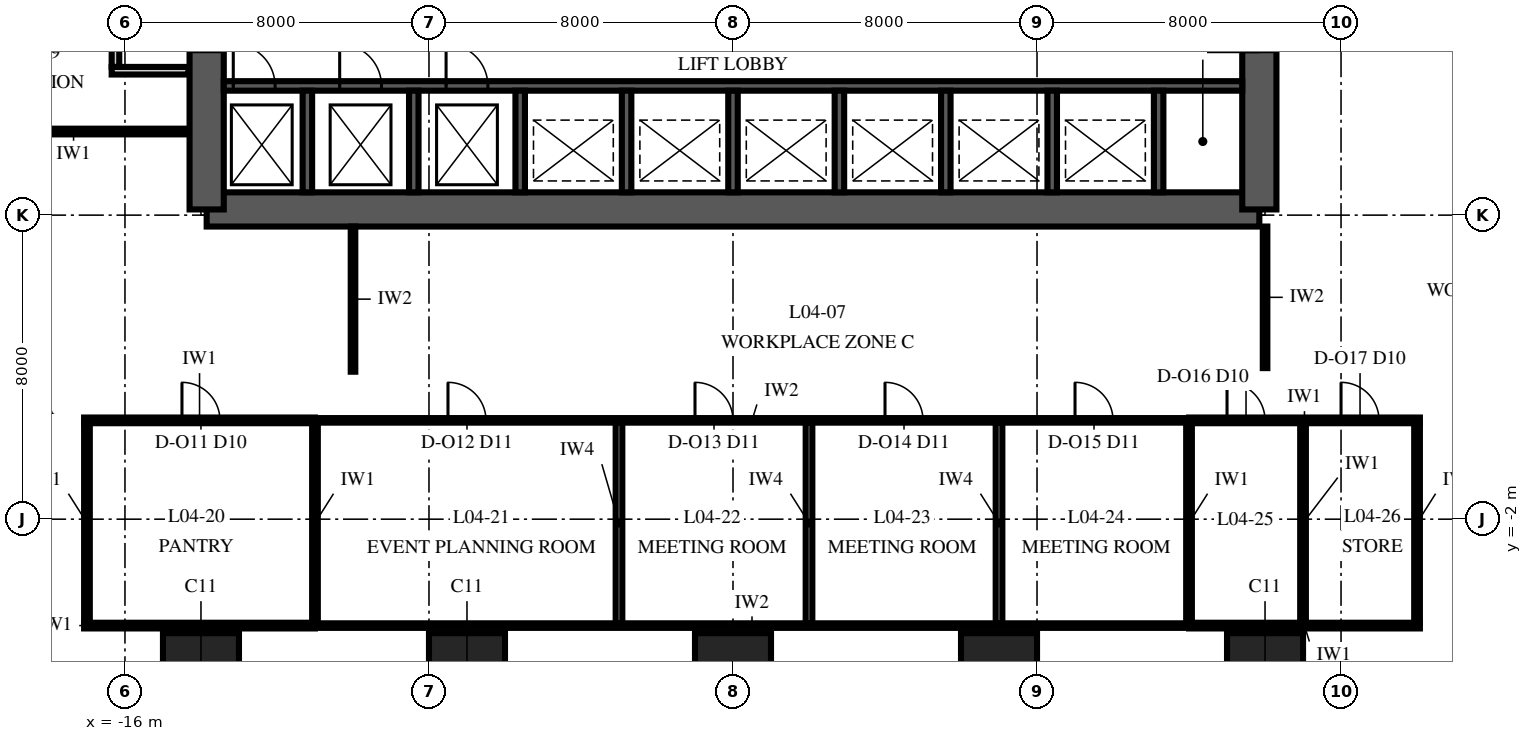
"""IFC4 building model, lengths in metres.
Left out: names, types, materials, properties, quantities, classifications, styles, units other than length and angle.
Written with IfcOpenShell. Run it as: python <this file> out.ifc"""

import sys

from ifc_helpers import new_model, si_unit, direction, frame, frame_2d, origin, origin_2d, place, context, subcontext, project, spatial, polyline, rectangle, outline, extrude, element, fill, save


model = new_model("IFC4")
c1 = context("Model", 3, precision=1e-05, world=origin(), true_north=direction((0.0, 1.0)))
c2 = subcontext(c1, "Body", "Model", "MODEL_VIEW")
j1 = project(units=[si_unit("LENGTHUNIT", "METRE"), si_unit("PLANEANGLEUNIT", "RADIAN")], contexts=[c1])
p1 = place(None, origin())
s1 = spatial("IfcSite", under=j1, at=p1, CompositionType="ELEMENT")
p2 = place(p1, origin())
s2 = spatial("IfcBuilding", under=s1, at=p2, CompositionType="ELEMENT")
p3 = place(p2, frame((0.0, 0.0, 28.0)))
s3 = spatial("IfcBuildingStorey", under=s2, at=p3, CompositionType="ELEMENT", Elevation=28.0)
for number, where, z_axis, x_axis in (
    (1, (-14.0, -6.0, 0.0), (0.0, 0.0, 1.0), (1.0, 0.0, 0.0)),
    (2, (-7.0, -6.0, 0.0), (0.0, 0.0, 1.0), (1.0, 0.0, 0.0)),
    (3, (0.0, -6.0, 0.0), (0.0, 0.0, 1.0), (1.0, 0.0, 0.0)),
    (4, (7.0, -6.0, 0.0), (0.0, 0.0, 1.0), (1.0, 0.0, 0.0)),
    (5, (14.0, -6.0, 0.0), (0.0, 0.0, 1.0), (1.0, 0.0, 0.0)),
):
    element("IfcColumn", number, at=place(p3, frame(where, z_axis=z_axis, x_axis=x_axis)), inside=s3, PredefinedType="COLUMN", context=c2, shape_type="SweptSolid", body=[
        extrude(rectangle(XDim=2.0, YDim=2.0, at=origin_2d()), origin(), (0.0, 0.0, 1.0), 4.0),
    ])
p4 = place(p3, frame((-13.85, 6.15, 0.0), z_axis=(0.0, 0.0, 1.0), x_axis=(1.0, 0.0, 0.0)))
e6 = element("IfcWall", 6, at=p4, inside=s3, PredefinedType="SHEAR", context=c2, shape_type="SweptSolid", body=[
    extrude(rectangle(XDim=27.7, YDim=0.9, at=frame_2d((13.85, 0.0))), origin(), (0.0, 0.0, 1.0), 4.0),
])
p5 = place(p3, frame((13.85, 6.15, 0.0), z_axis=(0.0, 0.0, 1.0), x_axis=(0.0, 1.0, 0.0)))
e7 = element("IfcWall", 7, at=p5, inside=s3, PredefinedType="SHEAR", context=c2, shape_type="SweptSolid", body=[
    extrude(outline(polyline([(0.0, -0.45), (17.7, -0.45), (17.7, 0.0), (17.25, 0.0), (17.25, 0.45), (0.45, 0.45), (0.45, 0.0), (0.0, 0.0), (0.0, -0.45)])), origin(), (0.0, 0.0, 1.0), 4.0),
])
p6 = place(p5, frame((4.15, 0.0, 0.0)))
e8 = element("IfcOpeningElement", 8, at=p6, cuts=e7, PredefinedType="OPENING", context=c2, shape_type="SweptSolid", body=[
    extrude(rectangle(XDim=1.8, YDim=2.4, at=frame_2d((0.9, 1.2))), frame((0.0, 0.465, 0.0), z_axis=(0.0, -1.0, 0.0), x_axis=(1.0, 0.0, 0.0)), (0.0, 0.0, 1.0), 0.93),
])
p7 = place(p3, frame((-13.85, 23.85, 0.0), z_axis=(0.0, 0.0, 1.0), x_axis=(0.0, -1.0, 0.0)))
e9 = element("IfcWall", 9, at=p7, inside=s3, PredefinedType="SHEAR", context=c2, shape_type="SweptSolid", body=[
    extrude(outline(polyline([(0.0, -0.45), (17.7, -0.45), (17.7, 0.0), (17.25, 0.0), (17.25, 0.45), (0.45, 0.45), (0.45, 0.0), (0.0, 0.0), (0.0, -0.45)])), origin(), (0.0, 0.0, 1.0), 4.0),
])
p8 = place(p7, frame((11.75, 0.0, 0.0)))
e10 = element("IfcOpeningElement", 10, at=p8, cuts=e9, PredefinedType="OPENING", context=c2, shape_type="SweptSolid", body=[
    extrude(rectangle(XDim=1.8, YDim=2.4, at=frame_2d((0.9, 1.2))), frame((0.0, 0.465, 0.0), z_axis=(0.0, -1.0, 0.0), x_axis=(1.0, 0.0, 0.0)), (0.0, 0.0, 1.0), 0.93),
])
p9 = place(p3, frame((-13.4, 9.4, 0.0), z_axis=(0.0, 0.0, 1.0), x_axis=(1.0, 0.0, 0.0)))
e11 = element("IfcWall", 11, at=p9, inside=s3, PredefinedType="SHEAR", context=c2, shape_type="SweptSolid", body=[
    extrude(rectangle(XDim=26.8, YDim=0.25, at=frame_2d((13.4, 0.0))), origin(), (0.0, 0.0, 1.0), 4.0),
])
p10 = place(p9, frame((0.25, 0.0, 0.0)))
e12 = element("IfcOpeningElement", 12, at=p10, cuts=e11, PredefinedType="OPENING", context=c2, shape_type="SweptSolid", body=[
    extrude(rectangle(XDim=1.1, YDim=2.1, at=frame_2d((0.55, 1.05))), frame((0.0, 0.14, 0.0), z_axis=(0.0, -1.0, 0.0), x_axis=(1.0, 0.0, 0.0)), (0.0, 0.0, 1.0), 0.28),
])
p11 = place(p9, frame((3.05, 0.0, 0.0)))
e13 = element("IfcOpeningElement", 13, at=p11, cuts=e11, PredefinedType="OPENING", context=c2, shape_type="SweptSolid", body=[
    extrude(rectangle(XDim=1.1, YDim=2.1, at=frame_2d((0.55, 1.05))), frame((0.0, 0.14, 0.0), z_axis=(0.0, -1.0, 0.0), x_axis=(1.0, 0.0, 0.0)), (0.0, 0.0, 1.0), 0.28),
])
p12 = place(p9, frame((5.85, 0.0, 0.0)))
e14 = element("IfcOpeningElement", 14, at=p12, cuts=e11, PredefinedType="OPENING", context=c2, shape_type="SweptSolid", body=[
    extrude(rectangle(XDim=1.1, YDim=2.1, at=frame_2d((0.55, 1.05))), frame((0.0, 0.14, 0.0), z_axis=(0.0, -1.0, 0.0), x_axis=(1.0, 0.0, 0.0)), (0.0, 0.0, 1.0), 0.28),
])
for number, where, z_axis, x_axis in (
    (15, (-11.2, 6.6, 0.0), (0.0, 0.0, 1.0), (0.0, 1.0, 0.0)),
    (16, (-8.4, 6.6, 0.0), (0.0, 0.0, 1.0), (0.0, 1.0, 0.0)),
    (17, (-5.6, 6.6, 0.0), (0.0, 0.0, 1.0), (0.0, 1.0, 0.0)),
    (18, (-2.8, 6.6, 0.0), (0.0, 0.0, 1.0), (0.0, 1.0, 0.0)),
    (19, (0.0, 6.6, 0.0), (0.0, 0.0, 1.0), (0.0, 1.0, 0.0)),
    (20, (2.8, 6.6, 0.0), (0.0, 0.0, 1.0), (0.0, 1.0, 0.0)),
    (21, (5.6, 6.6, 0.0), (0.0, 0.0, 1.0), (0.0, 1.0, 0.0)),
    (22, (8.4, 6.6, 0.0), (0.0, 0.0, 1.0), (0.0, 1.0, 0.0)),
    (23, (11.2, 6.6, 0.0), (0.0, 0.0, 1.0), (0.0, 1.0, 0.0)),
):
    element("IfcWall", number, at=place(p3, frame(where, z_axis=z_axis, x_axis=x_axis)), inside=s3, PredefinedType="SHEAR", context=c2, shape_type="SweptSolid", body=[
        extrude(rectangle(XDim=2.675, YDim=0.25, at=frame_2d((1.337, 0.0))), origin(), (0.0, 0.0, 1.0), 4.0),
    ])
p13 = place(p3, frame((-17.075, -4.8, 0.0), z_axis=(0.0, 0.0, 1.0), x_axis=(1.0, 0.0, 0.0)))
e24 = element("IfcWall", 24, at=p13, inside=s3, PredefinedType="PARTITIONING", context=c2, shape_type="SweptSolid", body=[
    extrude(rectangle(XDim=6.075, YDim=0.15, at=frame_2d((3.038, 0.0))), origin(), (0.0, 0.0, 1.0), 3.25),
])
p14 = place(p3, frame((-11.0, -4.8, 0.0), z_axis=(0.0, 0.0, 1.0), x_axis=(1.0, 0.0, 0.0)))
e25 = element("IfcWall", 25, at=p14, inside=s3, PredefinedType="PARTITIONING", context=c2, shape_type="SweptSolid", body=[
    extrude(rectangle(XDim=23.0, YDim=0.12, at=frame_2d((11.5, 0.0))), origin(), (0.0, 0.0, 1.0), 3.25),
])
p15 = place(p3, frame((12.0, -4.8, 0.0), z_axis=(0.0, 0.0, 1.0), x_axis=(1.0, 0.0, 0.0)))
e26 = element("IfcWall", 26, at=p15, inside=s3, PredefinedType="PARTITIONING", context=c2, shape_type="SweptSolid", body=[
    extrude(rectangle(XDim=6.075, YDim=0.15, at=frame_2d((3.038, 0.0))), origin(), (0.0, 0.0, 1.0), 3.25),
])
p16 = place(p3, frame((-17.075, 0.6, 0.0), z_axis=(0.0, 0.0, 1.0), x_axis=(1.0, 0.0, 0.0)))
e27 = element("IfcWall", 27, at=p16, inside=s3, PredefinedType="PARTITIONING", context=c2, shape_type="SweptSolid", body=[
    extrude(rectangle(XDim=6.075, YDim=0.15, at=frame_2d((3.038, 0.0))), origin(), (0.0, 0.0, 1.0), 3.25),
])
p17 = place(p16, frame((2.575, 0.0, 0.0)))
e28 = element("IfcOpeningElement", 28, at=p17, cuts=e27, PredefinedType="OPENING", context=c2, shape_type="SweptSolid", body=[
    extrude(rectangle(XDim=1.0, YDim=2.3, at=frame_2d((0.5, 1.15))), frame((0.0, 0.09, 0.0), z_axis=(0.0, -1.0, 0.0), x_axis=(1.0, 0.0, 0.0)), (0.0, 0.0, 1.0), 0.18),
])
p18 = place(p3, frame((-11.0, 0.6, 0.0), z_axis=(0.0, 0.0, 1.0), x_axis=(1.0, 0.0, 0.0)))
e29 = element("IfcWall", 29, at=p18, inside=s3, PredefinedType="PARTITIONING", context=c2, shape_type="SweptSolid", body=[
    extrude(rectangle(XDim=23.0, YDim=0.12, at=frame_2d((11.5, 0.0))), origin(), (0.0, 0.0, 1.0), 3.25),
])
p19 = place(p18, frame((3.5, 0.0, 0.0)))
e30 = element("IfcOpeningElement", 30, at=p19, cuts=e29, PredefinedType="OPENING", context=c2, shape_type="SweptSolid", body=[
    extrude(rectangle(XDim=1.0, YDim=2.4, at=frame_2d((0.5, 1.2))), frame((0.0, 0.075, 0.0), z_axis=(0.0, -1.0, 0.0), x_axis=(1.0, 0.0, 0.0)), (0.0, 0.0, 1.0), 0.15),
])
p20 = place(p18, frame((10.0, 0.0, 0.0)))
e31 = element("IfcOpeningElement", 31, at=p20, cuts=e29, PredefinedType="OPENING", context=c2, shape_type="SweptSolid", body=[
    extrude(rectangle(XDim=1.0, YDim=2.4, at=frame_2d((0.5, 1.2))), frame((0.0, 0.075, 0.0), z_axis=(0.0, -1.0, 0.0), x_axis=(1.0, 0.0, 0.0)), (0.0, 0.0, 1.0), 0.15),
])
p21 = place(p18, frame((15.0, 0.0, 0.0)))
e32 = element("IfcOpeningElement", 32, at=p21, cuts=e29, PredefinedType="OPENING", context=c2, shape_type="SweptSolid", body=[
    extrude(rectangle(XDim=1.0, YDim=2.4, at=frame_2d((0.5, 1.2))), frame((0.0, 0.075, 0.0), z_axis=(0.0, -1.0, 0.0), x_axis=(1.0, 0.0, 0.0)), (0.0, 0.0, 1.0), 0.15),
])
p22 = place(p18, frame((20.0, 0.0, 0.0)))
e33 = element("IfcOpeningElement", 33, at=p22, cuts=e29, PredefinedType="OPENING", context=c2, shape_type="SweptSolid", body=[
    extrude(rectangle(XDim=1.0, YDim=2.4, at=frame_2d((0.5, 1.2))), frame((0.0, 0.075, 0.0), z_axis=(0.0, -1.0, 0.0), x_axis=(1.0, 0.0, 0.0)), (0.0, 0.0, 1.0), 0.15),
])
p23 = place(p3, frame((12.0, 0.6, 0.0), z_axis=(0.0, 0.0, 1.0), x_axis=(1.0, 0.0, 0.0)))
e34 = element("IfcWall", 34, at=p23, inside=s3, PredefinedType="PARTITIONING", context=c2, shape_type="SweptSolid", body=[
    extrude(rectangle(XDim=6.075, YDim=0.15, at=frame_2d((3.038, 0.0))), origin(), (0.0, 0.0, 1.0), 3.25),
])
p24 = place(p23, frame((1.0, 0.0, 0.0)))
e35 = element("IfcOpeningElement", 35, at=p24, cuts=e34, PredefinedType="OPENING", context=c2, shape_type="SweptSolid", body=[
    extrude(rectangle(XDim=1.0, YDim=2.3, at=frame_2d((0.5, 1.15))), frame((0.0, 0.09, 0.0), z_axis=(0.0, -1.0, 0.0), x_axis=(1.0, 0.0, 0.0)), (0.0, 0.0, 1.0), 0.18),
])
p25 = place(p23, frame((4.0, 0.0, 0.0)))
e36 = element("IfcOpeningElement", 36, at=p25, cuts=e34, PredefinedType="OPENING", context=c2, shape_type="SweptSolid", body=[
    extrude(rectangle(XDim=1.0, YDim=2.3, at=frame_2d((0.5, 1.15))), frame((0.0, 0.09, 0.0), z_axis=(0.0, -1.0, 0.0), x_axis=(1.0, 0.0, 0.0)), (0.0, 0.0, 1.0), 0.18),
])
p26 = place(p3, frame((-20.375, 8.2, 0.0), z_axis=(0.0, 0.0, 1.0), x_axis=(1.0, 0.0, 0.0)))
e37 = element("IfcWall", 37, at=p26, inside=s3, PredefinedType="PARTITIONING", context=c2, shape_type="SweptSolid", body=[
    extrude(rectangle(XDim=6.045, YDim=0.15, at=frame_2d((3.022, 0.0))), origin(), (0.0, 0.0, 1.0), 3.85),
])
p27 = place(p3, frame((-16.35, 9.8, 0.0), z_axis=(0.0, 0.0, 1.0), x_axis=(1.0, 0.0, 0.0)))
e38 = element("IfcWall", 38, at=p27, inside=s3, PredefinedType="PARTITIONING", context=c2, shape_type="SweptSolid", body=[
    extrude(rectangle(XDim=2.02, YDim=0.2, at=frame_2d((1.01, 0.0))), origin(), (0.0, 0.0, 1.0), 3.85),
])
p28 = place(p3, frame((-17.0, -4.725, 0.0), z_axis=(0.0, 0.0, 1.0), x_axis=(0.0, 1.0, 0.0)))
e39 = element("IfcWall", 39, at=p28, inside=s3, PredefinedType="PARTITIONING", context=c2, shape_type="SweptSolid", body=[
    extrude(rectangle(XDim=5.25, YDim=0.15, at=frame_2d((2.625, 0.0))), origin(), (0.0, 0.0, 1.0), 3.85),
])
p29 = place(p3, frame((-16.25, 9.9, 0.0), z_axis=(0.0, 0.0, 1.0), x_axis=(0.0, 1.0, 0.0)))
e40 = element("IfcWall", 40, at=p29, inside=s3, PredefinedType="PARTITIONING", context=c2, shape_type="SweptSolid", body=[
    extrude(rectangle(XDim=16.25, YDim=0.2, at=frame_2d((8.125, 0.0))), origin(), (0.0, 0.0, 1.0), 3.25),
])
p30 = place(p29, frame((14.75, 0.0, 0.0)))
e41 = element("IfcOpeningElement", 41, at=p30, cuts=e40, PredefinedType="OPENING", context=c2, shape_type="SweptSolid", body=[
    extrude(rectangle(XDim=1.2, YDim=2.4, at=frame_2d((0.6, 1.2))), frame((0.0, 0.115, 0.0), z_axis=(0.0, -1.0, 0.0), x_axis=(1.0, 0.0, 0.0)), (0.0, 0.0, 1.0), 0.23),
])
p31 = place(p3, frame((-11.0, -4.725, 0.0), z_axis=(0.0, 0.0, 1.0), x_axis=(0.0, 1.0, 0.0)))
e42 = element("IfcWall", 42, at=p31, inside=s3, PredefinedType="PARTITIONING", context=c2, shape_type="SweptSolid", body=[
    extrude(rectangle(XDim=5.25, YDim=0.15, at=frame_2d((2.625, 0.0))), origin(), (0.0, 0.0, 1.0), 3.85),
])
p32 = place(p3, frame((-3.0, -4.74, 0.0), z_axis=(0.0, 0.0, 1.0), x_axis=(0.0, 1.0, 0.0)))
e43 = element("IfcWall", 43, at=p32, inside=s3, PredefinedType="PARTITIONING", context=c2, shape_type="SweptSolid", body=[
    extrude(rectangle(XDim=5.28, YDim=0.175, at=frame_2d((2.64, 0.0))), origin(), (0.0, 0.0, 1.0), 3.85),
])
p33 = place(p3, frame((2.0, -4.74, 0.0), z_axis=(0.0, 0.0, 1.0), x_axis=(0.0, 1.0, 0.0)))
e44 = element("IfcWall", 44, at=p33, inside=s3, PredefinedType="PARTITIONING", context=c2, shape_type="SweptSolid", body=[
    extrude(rectangle(XDim=5.28, YDim=0.175, at=frame_2d((2.64, 0.0))), origin(), (0.0, 0.0, 1.0), 3.25),
])
p34 = place(p3, frame((7.0, -4.74, 0.0), z_axis=(0.0, 0.0, 1.0), x_axis=(0.0, 1.0, 0.0)))
e45 = element("IfcWall", 45, at=p34, inside=s3, PredefinedType="PARTITIONING", context=c2, shape_type="SweptSolid", body=[
    extrude(rectangle(XDim=5.28, YDim=0.175, at=frame_2d((2.64, 0.0))), origin(), (0.0, 0.0, 1.0), 3.85),
])
for number, where, z_axis, x_axis in (
    (46, (12.0, -4.725, 0.0), (0.0, 0.0, 1.0), (0.0, 1.0, 0.0)),
    (47, (15.0, -4.725, 0.0), (0.0, 0.0, 1.0), (0.0, 1.0, 0.0)),
):
    element("IfcWall", number, at=place(p3, frame(where, z_axis=z_axis, x_axis=x_axis)), inside=s3, PredefinedType="PARTITIONING", context=c2, shape_type="SweptSolid", body=[
        extrude(rectangle(XDim=5.25, YDim=0.15, at=frame_2d((2.625, 0.0))), origin(), (0.0, 0.0, 1.0), 3.85),
    ])
p35 = place(p3, frame((18.0, -4.725, 0.0), z_axis=(0.0, 0.0, 1.0), x_axis=(0.0, 1.0, 0.0)))
e48 = element("IfcWall", 48, at=p35, inside=s3, PredefinedType="PARTITIONING", context=c2, shape_type="SweptSolid", body=[
    extrude(rectangle(XDim=5.25, YDim=0.15, at=frame_2d((2.625, 0.0))), origin(), (0.0, 0.0, 1.0), 3.25),
])
p36 = place(p3, frame((-9.999, 1.88, 0.0), z_axis=(0.0, 0.0, 1.0), x_axis=(0.0, 1.0, 0.0)))
e49 = element("IfcWall", 49, at=p36, inside=s3, PredefinedType="PARTITIONING", context=c2, shape_type="SweptSolid", body=[
    extrude(rectangle(XDim=3.82, YDim=0.12, at=frame_2d((1.91, 0.0))), origin(), (0.0, 0.0, 1.0), 3.85),
])
p37 = place(p3, frame((14.001, 1.975, 0.0), z_axis=(0.0, 0.0, 1.0), x_axis=(0.0, 1.0, 0.0)))
e50 = element("IfcWall", 50, at=p37, inside=s3, PredefinedType="PARTITIONING", context=c2, shape_type="SweptSolid", body=[
    extrude(rectangle(XDim=3.725, YDim=0.12, at=frame_2d((1.862, 0.0))), origin(), (0.0, 0.0, 1.0), 3.25),
])
p38 = place(p10, origin())
e51 = element("IfcDoor", 51, at=p38, inside=s3, OperationType="SLIDING_TO_LEFT", PredefinedType="DOOR", context=c2, shape_type="SweptSolid", body=[
    extrude(rectangle(XDim=1.1, YDim=2.1, at=frame_2d((0.55, 1.05))), frame((0.0, 0.125, 0.0), z_axis=(0.0, -1.0, 0.0), x_axis=(1.0, 0.0, 0.0)), (0.0, 0.0, 1.0), 0.25),
])
fill(e12, e51)
p39 = place(p11, origin())
e52 = element("IfcDoor", 52, at=p39, inside=s3, OperationType="SLIDING_TO_LEFT", PredefinedType="DOOR", context=c2, shape_type="SweptSolid", body=[
    extrude(rectangle(XDim=1.1, YDim=2.1, at=frame_2d((0.55, 1.05))), frame((0.0, 0.125, 0.0), z_axis=(0.0, -1.0, 0.0), x_axis=(1.0, 0.0, 0.0)), (0.0, 0.0, 1.0), 0.25),
])
fill(e13, e52)
p40 = place(p12, origin())
e53 = element("IfcDoor", 53, at=p40, inside=s3, OperationType="SLIDING_TO_LEFT", PredefinedType="DOOR", context=c2, shape_type="SweptSolid", body=[
    extrude(rectangle(XDim=1.1, YDim=2.1, at=frame_2d((0.55, 1.05))), frame((0.0, 0.125, 0.0), z_axis=(0.0, -1.0, 0.0), x_axis=(1.0, 0.0, 0.0)), (0.0, 0.0, 1.0), 0.25),
])
fill(e14, e53)
p41 = place(p17, origin())
e54 = element("IfcDoor", 54, at=p41, inside=s3, OperationType="SINGLE_SWING_LEFT", PredefinedType="DOOR", context=c2, shape_type="SweptSolid", body=[
    extrude(rectangle(XDim=1.0, YDim=2.3, at=frame_2d((0.5, 1.15))), frame((0.0, 0.075, 0.0), z_axis=(0.0, -1.0, 0.0), x_axis=(1.0, 0.0, 0.0)), (0.0, 0.0, 1.0), 0.149),
])
fill(e28, e54)
p42 = place(p19, origin())
e55 = element("IfcDoor", 55, at=p42, inside=s3, OperationType="SINGLE_SWING_RIGHT", PredefinedType="DOOR", context=c2, shape_type="SweptSolid", body=[
    extrude(rectangle(XDim=1.0, YDim=2.4, at=frame_2d((0.5, 1.2))), frame((0.0, 0.06, 0.0), z_axis=(0.0, -1.0, 0.0), x_axis=(1.0, 0.0, 0.0)), (0.0, 0.0, 1.0), 0.12),
])
fill(e30, e55)
p43 = place(p20, origin())
e56 = element("IfcDoor", 56, at=p43, inside=s3, OperationType="SINGLE_SWING_RIGHT", PredefinedType="DOOR", context=c2, shape_type="SweptSolid", body=[
    extrude(rectangle(XDim=1.0, YDim=2.4, at=frame_2d((0.5, 1.2))), frame((0.0, 0.06, 0.0), z_axis=(0.0, -1.0, 0.0), x_axis=(1.0, 0.0, 0.0)), (0.0, 0.0, 1.0), 0.12),
])
fill(e31, e56)
p44 = place(p21, origin())
e57 = element("IfcDoor", 57, at=p44, inside=s3, OperationType="SINGLE_SWING_RIGHT", PredefinedType="DOOR", context=c2, shape_type="SweptSolid", body=[
    extrude(rectangle(XDim=1.0, YDim=2.4, at=frame_2d((0.5, 1.2))), frame((0.0, 0.06, 0.0), z_axis=(0.0, -1.0, 0.0), x_axis=(1.0, 0.0, 0.0)), (0.0, 0.0, 1.0), 0.12),
])
fill(e32, e57)
p45 = place(p22, origin())
e58 = element("IfcDoor", 58, at=p45, inside=s3, OperationType="SINGLE_SWING_RIGHT", PredefinedType="DOOR", context=c2, shape_type="SweptSolid", body=[
    extrude(rectangle(XDim=1.0, YDim=2.4, at=frame_2d((0.5, 1.2))), frame((0.0, 0.06, 0.0), z_axis=(0.0, -1.0, 0.0), x_axis=(1.0, 0.0, 0.0)), (0.0, 0.0, 1.0), 0.12),
])
fill(e33, e58)
p46 = place(p24, origin())
e59 = element("IfcDoor", 59, at=p46, inside=s3, OperationType="SINGLE_SWING_LEFT", PredefinedType="DOOR", context=c2, shape_type="SweptSolid", body=[
    extrude(rectangle(XDim=1.0, YDim=2.3, at=frame_2d((0.5, 1.15))), frame((0.0, 0.075, 0.0), z_axis=(0.0, -1.0, 0.0), x_axis=(1.0, 0.0, 0.0)), (0.0, 0.0, 1.0), 0.149),
])
fill(e35, e59)
p47 = place(p25, origin())
e60 = element("IfcDoor", 60, at=p47, inside=s3, OperationType="SINGLE_SWING_LEFT", PredefinedType="DOOR", context=c2, shape_type="SweptSolid", body=[
    extrude(rectangle(XDim=1.0, YDim=2.3, at=frame_2d((0.5, 1.15))), frame((0.0, 0.075, 0.0), z_axis=(0.0, -1.0, 0.0), x_axis=(1.0, 0.0, 0.0)), (0.0, 0.0, 1.0), 0.149),
])
fill(e36, e60)
save(model, sys.argv[1])
